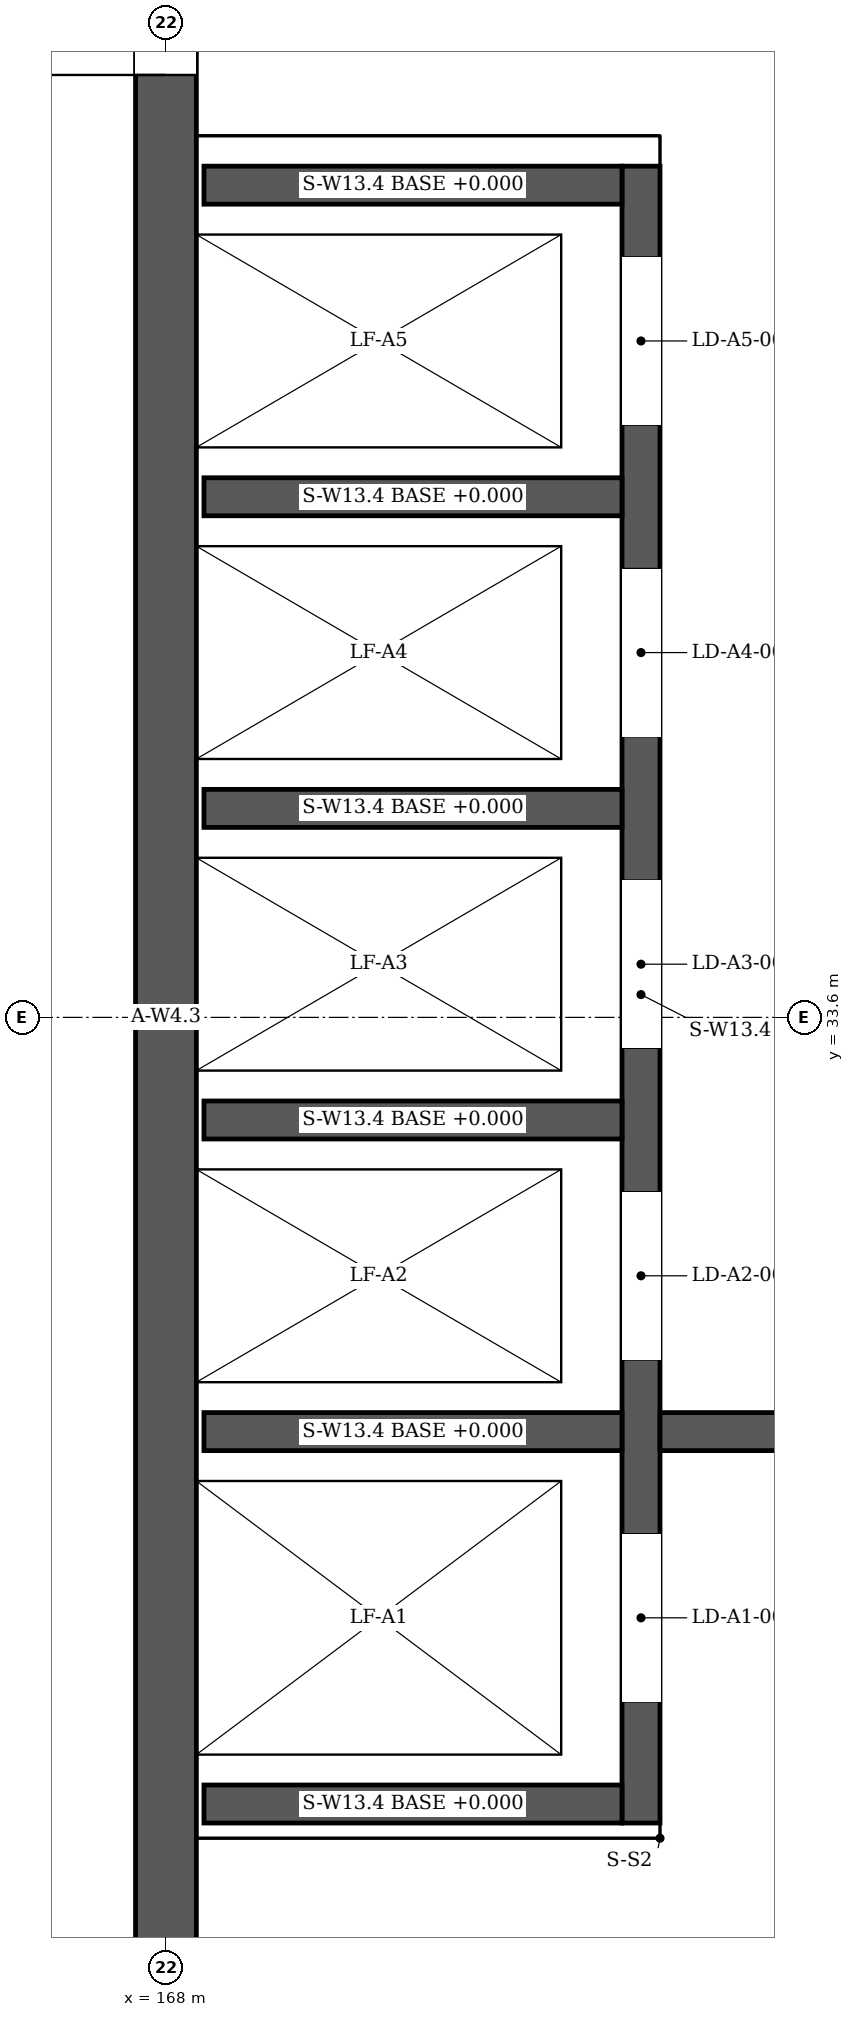
"""IFC4 building model, lengths in metres.
Left out: names, types, materials, properties, quantities, classifications, styles, units other than length and angle.
Written with IfcOpenShell. Run it as: python <this file> out.ifc"""

import sys

from ifc_helpers import new_model, si_unit, direction, frame, frame_2d, origin, place, context, subcontext, project, spatial, rectangle, extrude, element, fill, save


model = new_model("IFC4")
c1 = context("Model", 3, precision=1e-05, world=origin(), true_north=direction((0.0, 1.0)))
c2 = subcontext(c1, "Body", "Model", "MODEL_VIEW")
j1 = project(units=[si_unit("LENGTHUNIT", "METRE"), si_unit("PLANEANGLEUNIT", "RADIAN")], contexts=[c1])
p1 = place(None, origin())
s1 = spatial("IfcSite", under=j1, at=p1, CompositionType="ELEMENT")
p2 = place(p1, origin())
s2 = spatial("IfcBuilding", under=s1, at=p2, CompositionType="ELEMENT")
p3 = place(p2, origin())
s3 = spatial("IfcBuildingStorey", under=s2, at=p3, CompositionType="ELEMENT", Elevation=0.0)
p4 = place(p3, frame((168.0, 25.4, 0.0), z_axis=(0.0, 0.0, 1.0), x_axis=(0.0, 1.0, 0.0)))
e1 = element("IfcWall", 1, at=p4, inside=s3, PredefinedType="SOLIDWALL", context=c2, shape_type="SweptSolid", body=[
    extrude(rectangle(XDim=16.4, YDim=0.4, at=frame_2d((8.2, 0.0))), origin(), (0.0, 0.0, 1.0), 5.85),
])
p5 = place(p4, frame((1.0, 0.0, 0.0)))
e2 = element("IfcOpeningElement", 2, at=p5, cuts=e1, PredefinedType="OPENING", context=c2, shape_type="SweptSolid", body=[
    extrude(rectangle(XDim=1.0, YDim=2.1, at=frame_2d((0.5, 1.05))), frame((0.0, 0.21, 0.0), z_axis=(0.0, -1.0, 0.0), x_axis=(1.0, 0.0, 0.0)), (0.0, 0.0, 1.0), 0.42),
])
p6 = place(p4, frame((14.4, 0.0, 0.0)))
e3 = element("IfcOpeningElement", 3, at=p6, cuts=e1, PredefinedType="OPENING", context=c2, shape_type="SweptSolid", body=[
    extrude(rectangle(XDim=1.4, YDim=2.1, at=frame_2d((0.7, 1.05))), frame((0.0, 0.21, 0.0), z_axis=(0.0, -1.0, 0.0), x_axis=(1.0, 0.0, 0.0)), (0.0, 0.0, 1.0), 0.42),
])
p7 = place(p3, frame((171.125, 28.3, 0.0), z_axis=(0.0, 0.0, 1.0), x_axis=(0.0, 1.0, 0.0)))
e4 = element("IfcWall", 4, at=p7, inside=s3, PredefinedType="SOLIDWALL", context=c2, shape_type="SweptSolid", body=[
    extrude(rectangle(XDim=10.9, YDim=0.25, at=frame_2d((5.45, 0.0))), origin(), (0.0, 0.0, 1.0), 5.85),
])
p8 = place(p7, frame((0.8, 0.0, 0.0)))
e5 = element("IfcOpeningElement", 5, at=p8, cuts=e4, PredefinedType="OPENING", context=c2, shape_type="SweptSolid", body=[
    extrude(rectangle(XDim=1.1, YDim=2.1, at=frame_2d((0.55, 1.05))), frame((0.0, 0.135, 0.0), z_axis=(0.0, -1.0, 0.0), x_axis=(1.0, 0.0, 0.0)), (0.0, 0.0, 1.0), 0.27),
])
p9 = place(p7, frame((3.05, 0.0, 0.0)))
e6 = element("IfcOpeningElement", 6, at=p9, cuts=e4, PredefinedType="OPENING", context=c2, shape_type="SweptSolid", body=[
    extrude(rectangle(XDim=1.1, YDim=2.1, at=frame_2d((0.55, 1.05))), frame((0.0, 0.135, 0.0), z_axis=(0.0, -1.0, 0.0), x_axis=(1.0, 0.0, 0.0)), (0.0, 0.0, 1.0), 0.27),
])
p10 = place(p7, frame((5.1, 0.0, 0.0)))
e7 = element("IfcOpeningElement", 7, at=p10, cuts=e4, PredefinedType="OPENING", context=c2, shape_type="SweptSolid", body=[
    extrude(rectangle(XDim=1.1, YDim=2.1, at=frame_2d((0.55, 1.05))), frame((0.0, 0.135, 0.0), z_axis=(0.0, -1.0, 0.0), x_axis=(1.0, 0.0, 0.0)), (0.0, 0.0, 1.0), 0.27),
])
p11 = place(p7, frame((7.15, 0.0, 0.0)))
e8 = element("IfcOpeningElement", 8, at=p11, cuts=e4, PredefinedType="OPENING", context=c2, shape_type="SweptSolid", body=[
    extrude(rectangle(XDim=1.1, YDim=2.1, at=frame_2d((0.55, 1.05))), frame((0.0, 0.135, 0.0), z_axis=(0.0, -1.0, 0.0), x_axis=(1.0, 0.0, 0.0)), (0.0, 0.0, 1.0), 0.27),
])
p12 = place(p7, frame((9.2, 0.0, 0.0)))
e9 = element("IfcOpeningElement", 9, at=p12, cuts=e4, PredefinedType="OPENING", context=c2, shape_type="SweptSolid", body=[
    extrude(rectangle(XDim=1.1, YDim=2.1, at=frame_2d((0.55, 1.05))), frame((0.0, 0.135, 0.0), z_axis=(0.0, -1.0, 0.0), x_axis=(1.0, 0.0, 0.0)), (0.0, 0.0, 1.0), 0.27),
])
for number, where, z_axis, x_axis in (
    (10, (168.25, 28.425, 0.0), (0.0, 0.0, 1.0), (1.0, 0.0, 0.0)),
    (11, (168.25, 30.875, 0.0), (0.0, 0.0, 1.0), (1.0, 0.0, 0.0)),
    (12, (168.25, 32.925, 0.0), (0.0, 0.0, 1.0), (1.0, 0.0, 0.0)),
    (13, (168.25, 34.975, 0.0), (0.0, 0.0, 1.0), (1.0, 0.0, 0.0)),
    (14, (168.25, 37.025, 0.0), (0.0, 0.0, 1.0), (1.0, 0.0, 0.0)),
    (15, (168.25, 39.075, 0.0), (0.0, 0.0, 1.0), (1.0, 0.0, 0.0)),
):
    element("IfcWall", number, at=place(p3, frame(where, z_axis=z_axis, x_axis=x_axis)), inside=s3, PredefinedType="SOLIDWALL", context=c2, shape_type="SweptSolid", body=[
        extrude(rectangle(XDim=2.75, YDim=0.25, at=frame_2d((1.375, 0.0))), origin(), (0.0, 0.0, 1.0), 5.85),
    ])
p13 = place(p3, frame((171.25, 30.875, 0.0), z_axis=(0.0, 0.0, 1.0), x_axis=(1.0, 0.0, 0.0)))
e16 = element("IfcWall", 16, at=p13, inside=s3, PredefinedType="SOLIDWALL", context=c2, shape_type="SweptSolid", body=[
    extrude(rectangle(XDim=4.9, YDim=0.25, at=frame_2d((2.45, 0.0))), origin(), (0.0, 0.0, 1.0), 5.85),
])
p14 = place(p8, origin())
e17 = element("IfcDoor", 17, at=p14, inside=s3, OperationType="SLIDING_TO_LEFT", PredefinedType="DOOR", context=c2, shape_type="SweptSolid", body=[
    extrude(rectangle(XDim=1.1, YDim=2.1, at=frame_2d((0.55, 1.05))), frame((0.0, 0.025, 0.0), z_axis=(0.0, -1.0, 0.0), x_axis=(1.0, 0.0, 0.0)), (0.0, 0.0, 1.0), 0.05),
])
fill(e5, e17)
p15 = place(p9, origin())
e18 = element("IfcDoor", 18, at=p15, inside=s3, OperationType="SLIDING_TO_LEFT", PredefinedType="DOOR", context=c2, shape_type="SweptSolid", body=[
    extrude(rectangle(XDim=1.1, YDim=2.1, at=frame_2d((0.55, 1.05))), frame((0.0, 0.025, 0.0), z_axis=(0.0, -1.0, 0.0), x_axis=(1.0, 0.0, 0.0)), (0.0, 0.0, 1.0), 0.05),
])
fill(e6, e18)
p16 = place(p10, origin())
e19 = element("IfcDoor", 19, at=p16, inside=s3, OperationType="SLIDING_TO_LEFT", PredefinedType="DOOR", context=c2, shape_type="SweptSolid", body=[
    extrude(rectangle(XDim=1.1, YDim=2.1, at=frame_2d((0.55, 1.05))), frame((0.0, 0.025, 0.0), z_axis=(0.0, -1.0, 0.0), x_axis=(1.0, 0.0, 0.0)), (0.0, 0.0, 1.0), 0.05),
])
fill(e7, e19)
p17 = place(p11, origin())
e20 = element("IfcDoor", 20, at=p17, inside=s3, OperationType="SLIDING_TO_LEFT", PredefinedType="DOOR", context=c2, shape_type="SweptSolid", body=[
    extrude(rectangle(XDim=1.1, YDim=2.1, at=frame_2d((0.55, 1.05))), frame((0.0, 0.025, 0.0), z_axis=(0.0, -1.0, 0.0), x_axis=(1.0, 0.0, 0.0)), (0.0, 0.0, 1.0), 0.05),
])
fill(e8, e20)
p18 = place(p12, origin())
e21 = element("IfcDoor", 21, at=p18, inside=s3, OperationType="SLIDING_TO_LEFT", PredefinedType="DOOR", context=c2, shape_type="SweptSolid", body=[
    extrude(rectangle(XDim=1.1, YDim=2.1, at=frame_2d((0.55, 1.05))), frame((0.0, 0.025, 0.0), z_axis=(0.0, -1.0, 0.0), x_axis=(1.0, 0.0, 0.0)), (0.0, 0.0, 1.0), 0.05),
])
fill(e9, e21)
p19 = place(p6, origin())
e22 = element("IfcDoor", 22, at=p19, inside=s3, OperationType="DOUBLE_DOOR_DOUBLE_SWING", PredefinedType="DOOR", context=c2, shape_type="SweptSolid", body=[
    extrude(rectangle(XDim=1.4, YDim=2.1, at=frame_2d((0.7, 1.05))), frame((0.0, 0.025, 0.0), z_axis=(0.0, -1.0, 0.0), x_axis=(1.0, 0.0, 0.0)), (0.0, 0.0, 1.0), 0.05),
])
fill(e3, e22)
save(model, sys.argv[1])
